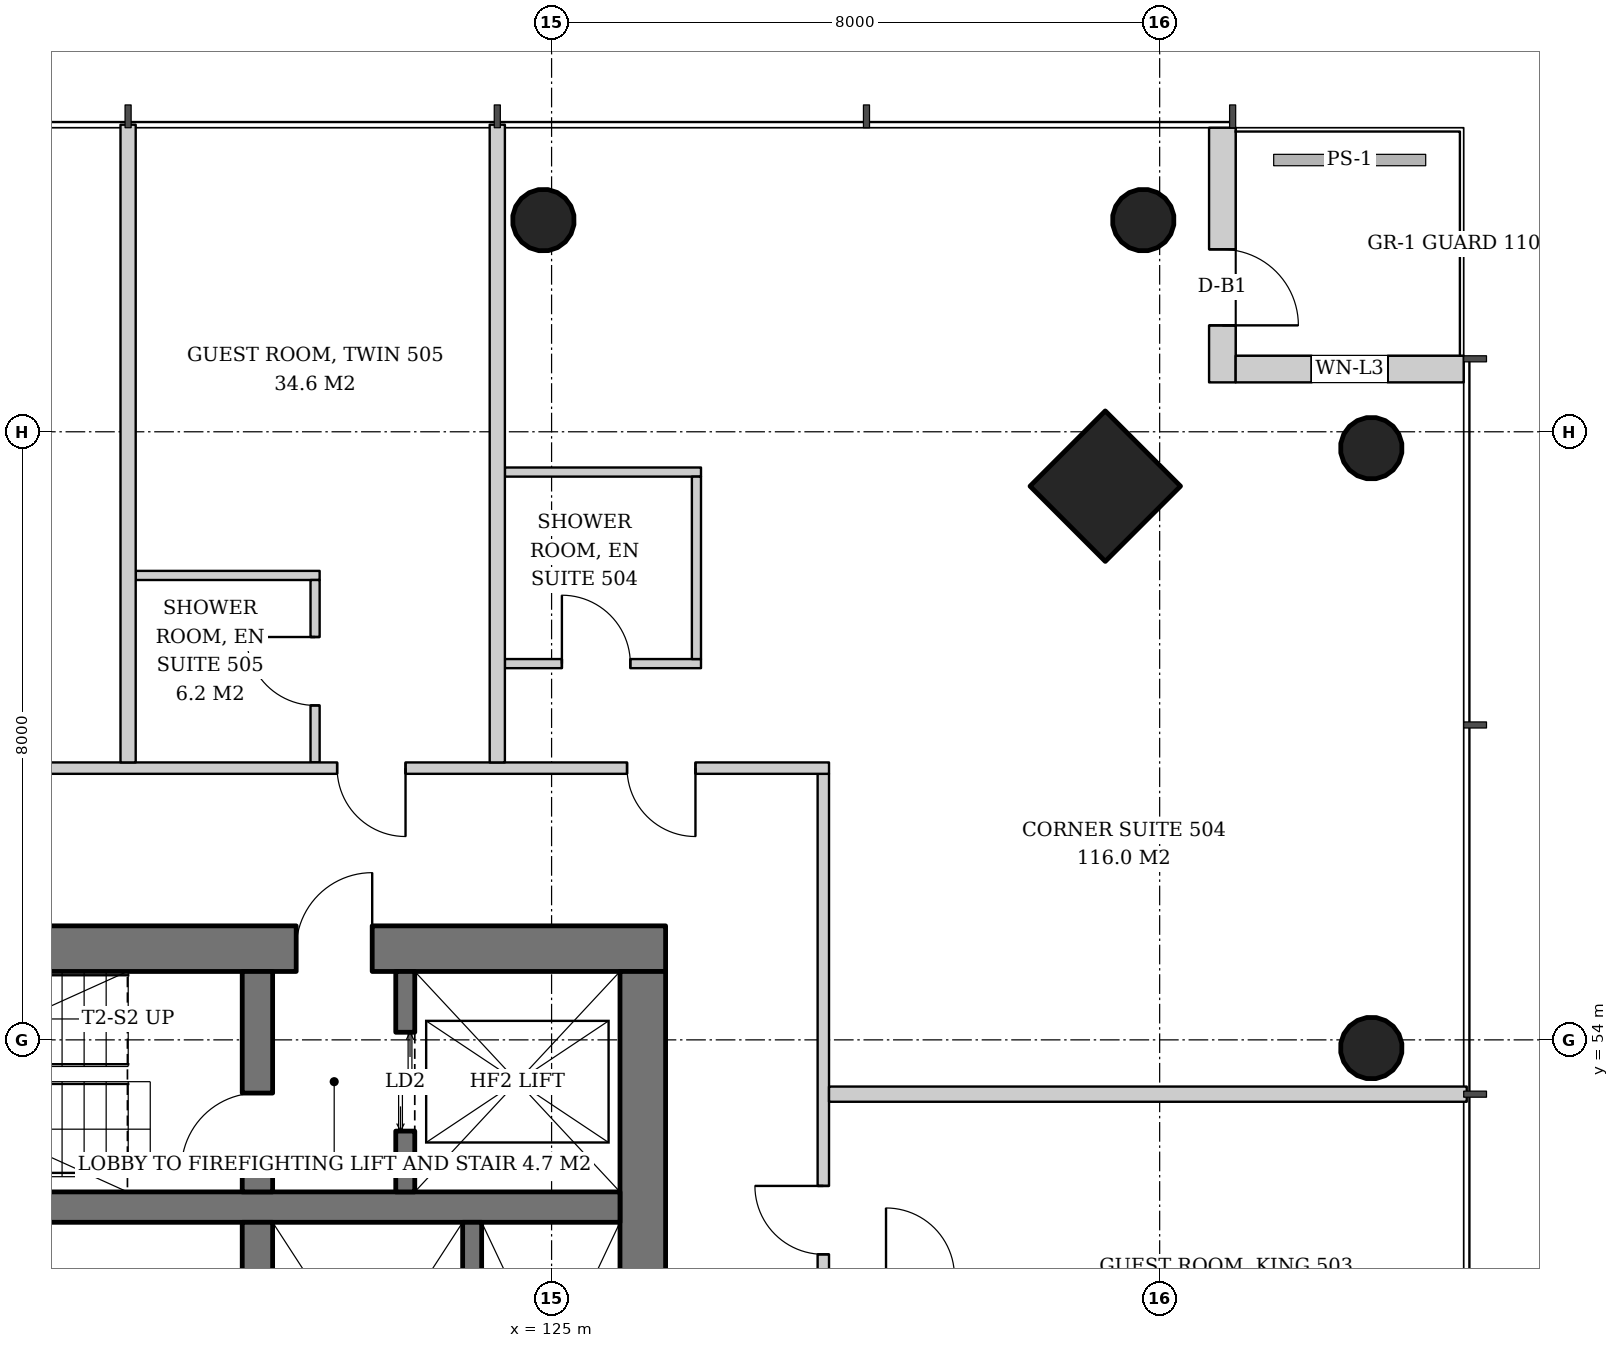
"""IFC4 building model, lengths in metres.
Left out: names, types, materials, properties, quantities, classifications, styles, units other than length and angle.
Written with IfcOpenShell. Run it as: python <this file> out.ifc"""

import sys

from ifc_helpers import new_model, si_unit, direction, frame, frame_2d, origin, origin_2d, place, context, subcontext, project, spatial, rectangle, hollow_circle, extrude, element, fill, save


model = new_model("IFC4")
c1 = context("Model", 3, precision=1e-05, world=origin(), true_north=direction((0.0, 1.0)))
c2 = subcontext(c1, "Body", "Model", "MODEL_VIEW")
j1 = project(units=[si_unit("LENGTHUNIT", "METRE"), si_unit("PLANEANGLEUNIT", "RADIAN")], contexts=[c1])
p1 = place(None, origin())
s1 = spatial("IfcSite", under=j1, at=p1, CompositionType="ELEMENT")
p2 = place(p1, origin())
s2 = spatial("IfcBuilding", under=s1, at=p2, CompositionType="ELEMENT")
p3 = place(p2, frame((0.0, 0.0, 24.8)))
s3 = spatial("IfcBuildingStorey", under=s2, at=p3, CompositionType="ELEMENT", Elevation=24.8)
p4 = place(p3, frame((132.336, 61.336, 0.0), z_axis=(-0.043029647111, -0.043029647111, 0.998146732169), x_axis=(0.707106781187, -0.707106781187, 0.0)))
e1 = element("IfcColumn", 1, at=p4, inside=s3, PredefinedType="COLUMN", context=c2, shape_type="SweptSolid", body=[
    extrude(rectangle(XDim=1.4, YDim=1.4, at=origin_2d()), origin(), (0.0, 0.0, 1.0), 3.807),
])
p5 = place(p3, frame((135.836, 61.836, 0.0), z_axis=(-0.043029647111, -0.043029647111, 0.998146732169), x_axis=(0.707106781187, -0.707106781187, 0.0)))
e2 = element("IfcColumn", 2, at=p5, inside=s3, PredefinedType="COLUMN", context=c2, shape_type="SweptSolid", body=[
    extrude(hollow_circle(Radius=0.406, WallThickness=0.03, at=origin_2d()), origin(), (0.0, 0.0, 1.0), 3.807),
])
p6 = place(p3, frame((135.836, 53.918, 0.0), z_axis=(-0.043059525333, -0.021561848751, 0.998839808957), x_axis=(0.44774654769, -0.894160516368, 0.0)))
e3 = element("IfcColumn", 3, at=p6, inside=s3, PredefinedType="COLUMN", context=c2, shape_type="SweptSolid", body=[
    extrude(hollow_circle(Radius=0.406, WallThickness=0.03, at=origin_2d()), origin(), (0.0, 0.0, 1.0), 3.804),
])
p7 = place(p3, frame((132.836, 64.836, 0.0), z_axis=(-0.043029647111, -0.043029647111, 0.998146732169), x_axis=(0.707106781187, -0.707106781187, 0.0)))
e4 = element("IfcColumn", 4, at=p7, inside=s3, PredefinedType="COLUMN", context=c2, shape_type="SweptSolid", body=[
    extrude(hollow_circle(Radius=0.406, WallThickness=0.03, at=origin_2d()), origin(), (0.0, 0.0, 1.0), 3.807),
])
p8 = place(p3, frame((124.918, 64.836, 0.0), z_axis=(-0.021561848751, -0.043059525333, 0.998839808957), x_axis=(0.894160516368, -0.44774654769, 0.0)))
e5 = element("IfcColumn", 5, at=p8, inside=s3, PredefinedType="COLUMN", context=c2, shape_type="SweptSolid", body=[
    extrude(hollow_circle(Radius=0.406, WallThickness=0.03, at=origin_2d()), origin(), (0.0, 0.0, 1.0), 3.804),
])
p9 = place(p3, frame((107.5, 55.2, 0.0), z_axis=(0.0, 0.0, 1.0), x_axis=(1.0, 0.0, 0.0)))
e6 = element("IfcWall", 6, at=p9, inside=s3, PredefinedType="SHEAR", context=c2, shape_type="SweptSolid", body=[
    extrude(rectangle(XDim=19.0, YDim=0.6, at=frame_2d((9.5, 0.0))), origin(), (0.0, 0.0, 1.0), 3.8),
])
p10 = place(p9, frame((14.14, 0.0, 0.0)))
e7 = element("IfcOpeningElement", 7, at=p10, cuts=e6, PredefinedType="OPENING", context=c2, shape_type="SweptSolid", body=[
    extrude(rectangle(XDim=1.0, YDim=2.1, at=frame_2d((0.5, 1.05))), frame((0.0, 0.31, 0.0), z_axis=(0.0, -1.0, 0.0), x_axis=(1.0, 0.0, 0.0)), (0.0, 0.0, 1.0), 0.62),
])
p11 = place(p9, frame((1.675, 0.0, 0.0)))
e8 = element("IfcOpeningElement", 8, at=p11, cuts=e6, PredefinedType="OPENING", context=c2, shape_type="SweptSolid", body=[
    extrude(rectangle(XDim=1.0, YDim=2.1, at=frame_2d((0.5, 1.05))), frame((0.0, 0.31, 0.0), z_axis=(0.0, -1.0, 0.0), x_axis=(1.0, 0.0, 0.0)), (0.0, 0.0, 1.0), 0.62),
])
p12 = place(p9, frame((3.587, 0.0, 0.0)))
e9 = element("IfcOpeningElement", 9, at=p12, cuts=e6, PredefinedType="OPENING", context=c2, shape_type="SweptSolid", body=[
    extrude(rectangle(XDim=1.0, YDim=2.1, at=frame_2d((0.5, 1.05))), frame((0.0, 0.31, 0.0), z_axis=(0.0, -1.0, 0.0), x_axis=(1.0, 0.0, 0.0)), (0.0, 0.0, 1.0), 0.62),
])
p13 = place(p3, frame((126.2, 37.1, 0.0), z_axis=(0.0, 0.0, 1.0), x_axis=(0.0, 1.0, 0.0)))
e10 = element("IfcWall", 10, at=p13, inside=s3, PredefinedType="SHEAR", context=c2, shape_type="SweptSolid", body=[
    extrude(rectangle(XDim=17.8, YDim=0.6, at=frame_2d((8.9, 0.0))), origin(), (0.0, 0.0, 1.0), 3.8),
])
p14 = place(p13, frame((8.0, 0.0, 0.0)))
e11 = element("IfcOpeningElement", 11, at=p14, cuts=e10, PredefinedType="OPENING", context=c2, shape_type="SweptSolid", body=[
    extrude(rectangle(XDim=1.8, YDim=2.4, at=frame_2d((0.9, 1.2))), frame((0.0, 0.31, 0.0), z_axis=(0.0, -1.0, 0.0), x_axis=(1.0, 0.0, 0.0)), (0.0, 0.0, 1.0), 0.62),
])
p15 = place(p3, frame((108.1, 51.8, 0.0), z_axis=(0.0, 0.0, 1.0), x_axis=(1.0, 0.0, 0.0)))
e12 = element("IfcWall", 12, at=p15, inside=s3, PredefinedType="SHEAR", context=c2, shape_type="SweptSolid", body=[
    extrude(rectangle(XDim=17.8, YDim=0.4, at=frame_2d((8.9, 0.0))), origin(), (0.0, 0.0, 1.0), 3.8),
])
p16 = place(p3, frame((121.13, 40.4, 0.0), z_axis=(0.0, 0.0, 1.0), x_axis=(0.0, 1.0, 0.0)))
e13 = element("IfcWall", 13, at=p16, inside=s3, PredefinedType="SHEAR", context=c2, shape_type="SweptSolid", body=[
    extrude(rectangle(XDim=11.2, YDim=0.4, at=frame_2d((5.6, 0.0))), origin(), (0.0, 0.0, 1.0), 3.8),
])
p17 = place(p3, frame((121.13, 52.0, 0.0), z_axis=(0.0, 0.0, 1.0), x_axis=(0.0, 1.0, 0.0)))
e14 = element("IfcWall", 14, at=p17, inside=s3, PredefinedType="SHEAR", context=c2, shape_type="SweptSolid", body=[
    extrude(rectangle(XDim=2.9, YDim=0.4, at=frame_2d((1.45, 0.0))), origin(), (0.0, 0.0, 1.0), 3.8),
])
p18 = place(p17, frame((0.3, 0.0, 0.0)))
e15 = element("IfcOpeningElement", 15, at=p18, cuts=e14, PredefinedType="OPENING", context=c2, shape_type="SweptSolid", body=[
    extrude(rectangle(XDim=1.0, YDim=2.1, at=frame_2d((0.5, 1.05))), frame((0.0, 0.21, 0.0), z_axis=(0.0, -1.0, 0.0), x_axis=(1.0, 0.0, 0.0)), (0.0, 0.0, 1.0), 0.42),
])
p19 = place(p3, frame((133.825, 66.0, 0.0), z_axis=(0.0, 0.0, 1.0), x_axis=(0.0, -1.0, 0.0)))
e16 = element("IfcWall", 16, at=p19, inside=s3, PredefinedType="SOLIDWALL", context=c2, shape_type="SweptSolid", body=[
    extrude(rectangle(XDim=3.35, YDim=0.35, at=frame_2d((1.675, 0.0))), origin(), (0.0, 0.0, 1.0), 3.6),
])
p20 = place(p19, frame((1.6, 0.0, 0.0)))
e17 = element("IfcOpeningElement", 17, at=p20, cuts=e16, PredefinedType="OPENING", context=c2, shape_type="SweptSolid", body=[
    extrude(rectangle(XDim=1.0, YDim=2.4, at=frame_2d((0.5, 1.2))), frame((0.0, 0.185, 0.0), z_axis=(0.0, -1.0, 0.0), x_axis=(1.0, 0.0, 0.0)), (0.0, 0.0, 1.0), 0.37),
])
p21 = place(p3, frame((134.0, 62.825, 0.0), z_axis=(0.0, 0.0, 1.0), x_axis=(1.0, 0.0, 0.0)))
e18 = element("IfcWall", 18, at=p21, inside=s3, PredefinedType="SOLIDWALL", context=c2, shape_type="SweptSolid", body=[
    extrude(rectangle(XDim=3.0, YDim=0.35, at=frame_2d((1.5, 0.0))), origin(), (0.0, 0.0, 1.0), 3.6),
])
p22 = place(p21, frame((1.0, 0.0, 0.9)))
e19 = element("IfcOpeningElement", 19, at=p22, cuts=e18, PredefinedType="OPENING", context=c2, shape_type="SweptSolid", body=[
    extrude(rectangle(XDim=1.0, YDim=2.4, at=frame_2d((0.5, 1.2))), frame((0.0, 0.185, 0.0), z_axis=(0.0, -1.0, 0.0), x_axis=(1.0, 0.0, 0.0)), (0.0, 0.0, 1.0), 0.37),
])
p23 = place(p3, frame((123.075, 52.0, 0.0), z_axis=(0.0, 0.0, 1.0), x_axis=(0.0, 1.0, 0.0)))
e20 = element("IfcWall", 20, at=p23, inside=s3, PredefinedType="SHEAR", context=c2, shape_type="SweptSolid", body=[
    extrude(rectangle(XDim=2.9, YDim=0.25, at=frame_2d((1.45, 0.0))), origin(), (0.0, 0.0, 1.0), 3.8),
])
p24 = place(p23, frame((0.8, 0.0, 0.0)))
e21 = element("IfcOpeningElement", 21, at=p24, cuts=e20, PredefinedType="OPENING", context=c2, shape_type="SweptSolid", body=[
    extrude(rectangle(XDim=1.3, YDim=2.2, at=frame_2d((0.65, 1.1))), frame((0.0, 0.135, 0.0), z_axis=(0.0, -1.0, 0.0), x_axis=(1.0, 0.0, 0.0)), (0.0, 0.0, 1.0), 0.27),
])
p25 = place(p3, frame((123.955, 47.75, 0.0), z_axis=(0.0, 0.0, 1.0), x_axis=(0.0, 1.0, 0.0)))
e22 = element("IfcWall", 22, at=p25, inside=s3, PredefinedType="SHEAR", context=c2, shape_type="SweptSolid", body=[
    extrude(rectangle(XDim=3.85, YDim=0.25, at=frame_2d((1.925, 0.0))), origin(), (0.0, 0.0, 1.0), 3.8),
])
p26 = place(p3, frame((128.575, 34.35, 0.0), z_axis=(0.0, 0.0, 1.0), x_axis=(0.0, 1.0, 0.0)))
e23 = element("IfcWall", 23, at=p26, inside=s3, PredefinedType="PARTITIONING", context=c2, shape_type="SweptSolid", body=[
    extrude(rectangle(XDim=23.15, YDim=0.15, at=frame_2d((11.575, 0.0))), origin(), (0.0, 0.0, 1.0), 2.8),
])
p27 = place(p26, frame((1.757, 0.0, 0.0)))
e24 = element("IfcOpeningElement", 24, at=p27, cuts=e23, PredefinedType="OPENING", context=c2, shape_type="SweptSolid", body=[
    extrude(rectangle(XDim=0.9, YDim=2.1, at=frame_2d((0.45, 1.05))), frame((0.0, 0.085, 0.0), z_axis=(0.0, -1.0, 0.0), x_axis=(1.0, 0.0, 0.0)), (0.0, 0.0, 1.0), 0.17),
])
p28 = place(p26, frame((10.428, 0.0, 0.0)))
e25 = element("IfcOpeningElement", 25, at=p28, cuts=e23, PredefinedType="OPENING", context=c2, shape_type="SweptSolid", body=[
    extrude(rectangle(XDim=0.9, YDim=2.1, at=frame_2d((0.45, 1.05))), frame((0.0, 0.085, 0.0), z_axis=(0.0, -1.0, 0.0), x_axis=(1.0, 0.0, 0.0)), (0.0, 0.0, 1.0), 0.17),
])
p29 = place(p26, frame((16.829, 0.0, 0.0)))
e26 = element("IfcOpeningElement", 26, at=p29, cuts=e23, PredefinedType="OPENING", context=c2, shape_type="SweptSolid", body=[
    extrude(rectangle(XDim=0.9, YDim=2.1, at=frame_2d((0.45, 1.05))), frame((0.0, 0.085, 0.0), z_axis=(0.0, -1.0, 0.0), x_axis=(1.0, 0.0, 0.0)), (0.0, 0.0, 1.0), 0.17),
])
p30 = place(p3, frame((128.65, 53.286, 0.0), z_axis=(0.0, 0.0, 1.0), x_axis=(1.0, 0.0, 0.0)))
e27 = element("IfcWall", 27, at=p30, inside=s3, PredefinedType="PARTITIONING", context=c2, shape_type="SweptSolid", body=[
    extrude(rectangle(XDim=8.39, YDim=0.2, at=frame_2d((4.195, 0.0))), origin(), (0.0, 0.0, 1.0), 3.05),
])
p31 = place(p3, frame((124.386, 58.95, 0.0), z_axis=(0.0, 0.0, 1.0), x_axis=(1.0, 0.0, 0.0)))
e28 = element("IfcWall", 28, at=p31, inside=s3, PredefinedType="PARTITIONING", context=c2, shape_type="SweptSolid", body=[
    extrude(rectangle(XDim=2.58, YDim=0.12, at=frame_2d((1.29, 0.0))), origin(), (0.0, 0.0, 1.0), 2.8),
])
p32 = place(p31, frame((0.75, 0.0, 0.0)))
e29 = element("IfcOpeningElement", 29, at=p32, cuts=e28, PredefinedType="OPENING", context=c2, shape_type="SweptSolid", body=[
    extrude(rectangle(XDim=0.9, YDim=2.1, at=frame_2d((0.45, 1.05))), frame((0.0, 0.07, 0.0), z_axis=(0.0, -1.0, 0.0), x_axis=(1.0, 0.0, 0.0)), (0.0, 0.0, 1.0), 0.14),
])
p33 = place(p3, frame((124.386, 61.47, 0.0), z_axis=(0.0, 0.0, 1.0), x_axis=(1.0, 0.0, 0.0)))
e30 = element("IfcWall", 30, at=p33, inside=s3, PredefinedType="PARTITIONING", context=c2, shape_type="SweptSolid", body=[
    extrude(rectangle(XDim=2.58, YDim=0.12, at=frame_2d((1.29, 0.0))), origin(), (0.0, 0.0, 1.0), 2.8),
])
p34 = place(p3, frame((126.906, 59.01, 0.0), z_axis=(0.0, 0.0, 1.0), x_axis=(0.0, 1.0, 0.0)))
e31 = element("IfcWall", 31, at=p34, inside=s3, PredefinedType="PARTITIONING", context=c2, shape_type="SweptSolid", body=[
    extrude(rectangle(XDim=2.4, YDim=0.12, at=frame_2d((1.2, 0.0))), origin(), (0.0, 0.0, 1.0), 2.847),
])
p35 = place(p3, frame((121.948, 60.11, 0.0), z_axis=(0.0, 0.0, 1.0), x_axis=(-1.0, 0.0, 0.0)))
e32 = element("IfcWall", 32, at=p35, inside=s3, PredefinedType="PARTITIONING", context=c2, shape_type="SweptSolid", body=[
    extrude(rectangle(XDim=2.42, YDim=0.12, at=frame_2d((1.21, 0.0))), origin(), (0.0, 0.0, 1.0), 3.6),
])
p36 = place(p3, frame((121.889, 57.65, 0.0), z_axis=(0.0, 0.0, 1.0), x_axis=(0.0, 1.0, 0.0)))
e33 = element("IfcWall", 33, at=p36, inside=s3, PredefinedType="PARTITIONING", context=c2, shape_type="SweptSolid", body=[
    extrude(rectangle(XDim=2.4, YDim=0.12, at=frame_2d((1.2, 0.0))), origin(), (0.0, 0.0, 1.0), 3.6),
])
p37 = place(p36, frame((0.75, 0.0, 0.0)))
e34 = element("IfcOpeningElement", 34, at=p37, cuts=e33, PredefinedType="OPENING", context=c2, shape_type="SweptSolid", body=[
    extrude(rectangle(XDim=0.9, YDim=2.1, at=frame_2d((0.45, 1.05))), frame((0.0, 0.07, 0.0), z_axis=(0.0, -1.0, 0.0), x_axis=(1.0, 0.0, 0.0)), (0.0, 0.0, 1.0), 0.14),
])
p38 = place(p3, frame((128.65, 57.575, 0.0), z_axis=(0.0, 0.0, 1.0), x_axis=(-1.0, 0.0, 0.0)))
e35 = element("IfcWall", 35, at=p38, inside=s3, PredefinedType="PARTITIONING", context=c2, shape_type="SweptSolid", body=[
    extrude(rectangle(XDim=23.15, YDim=0.15, at=frame_2d((11.575, 0.0))), origin(), (0.0, 0.0, 1.0), 2.8),
])
p39 = place(p38, frame((1.757, 0.0, 0.0)))
e36 = element("IfcOpeningElement", 36, at=p39, cuts=e35, PredefinedType="OPENING", context=c2, shape_type="SweptSolid", body=[
    extrude(rectangle(XDim=0.9, YDim=2.1, at=frame_2d((0.45, 1.05))), frame((0.0, 0.085, 0.0), z_axis=(0.0, -1.0, 0.0), x_axis=(1.0, 0.0, 0.0)), (0.0, 0.0, 1.0), 0.17),
])
p40 = place(p38, frame((5.572, 0.0, 0.0)))
e37 = element("IfcOpeningElement", 37, at=p40, cuts=e35, PredefinedType="OPENING", context=c2, shape_type="SweptSolid", body=[
    extrude(rectangle(XDim=0.9, YDim=2.1, at=frame_2d((0.45, 1.05))), frame((0.0, 0.085, 0.0), z_axis=(0.0, -1.0, 0.0), x_axis=(1.0, 0.0, 0.0)), (0.0, 0.0, 1.0), 0.17),
])
p41 = place(p38, frame((11.921, 0.0, 0.0)))
e38 = element("IfcOpeningElement", 38, at=p41, cuts=e35, PredefinedType="OPENING", context=c2, shape_type="SweptSolid", body=[
    extrude(rectangle(XDim=1.0, YDim=2.1, at=frame_2d((0.5, 1.05))), frame((0.0, 0.085, 0.0), z_axis=(0.0, -1.0, 0.0), x_axis=(1.0, 0.0, 0.0)), (0.0, 0.0, 1.0), 0.17),
])
for number, where, z_axis, x_axis in (
    (39, (124.286, 57.65, 0.0), (0.0, 0.0, 1.0), (0.0, 1.0, 0.0)),
    (40, (119.428, 57.65, 0.0), (0.0, 0.0, 1.0), (0.0, 1.0, 0.0)),
):
    element("IfcWall", number, at=place(p3, frame(where, z_axis=z_axis, x_axis=x_axis)), inside=s3, PredefinedType="PARTITIONING", context=c2, shape_type="SweptSolid", body=[
        extrude(rectangle(XDim=8.39, YDim=0.2, at=frame_2d((4.195, 0.0))), origin(), (0.0, 0.0, 1.0), 3.05),
    ])
p42 = place(p20, origin())
e41 = element("IfcDoor", 41, at=p42, inside=s3, OperationType="SINGLE_SWING_RIGHT", PredefinedType="DOOR", context=c2, shape_type="SweptSolid", body=[
    extrude(rectangle(XDim=1.0, YDim=2.4, at=frame_2d((0.5, 1.2))), frame((0.0, 0.025, 0.0), z_axis=(0.0, -1.0, 0.0), x_axis=(1.0, 0.0, 0.0)), (0.0, 0.0, 1.0), 0.05),
])
fill(e17, e41)
p43 = place(p22, origin())
e42 = element("IfcWindow", 42, at=p43, inside=s3, PartitioningType="SINGLE_PANEL", PredefinedType="WINDOW", context=c2, shape_type="SweptSolid", body=[
    extrude(rectangle(XDim=1.0, YDim=2.4, at=frame_2d((0.5, 1.2))), frame((0.0, 0.03, 0.0), z_axis=(0.0, -1.0, 0.0), x_axis=(1.0, 0.0, 0.0)), (0.0, 0.0, 1.0), 0.06),
])
fill(e19, e42)
p44 = place(p24, origin())
e43 = element("IfcDoor", 43, at=p44, inside=s3, OperationType="DOUBLE_DOOR_SLIDING", PredefinedType="DOOR", context=c2, shape_type="SweptSolid", body=[
    extrude(rectangle(XDim=1.3, YDim=2.2, at=frame_2d((0.65, 1.1))), frame((0.0, 0.025, 0.0), z_axis=(0.0, -1.0, 0.0), x_axis=(1.0, 0.0, 0.0)), (0.0, 0.0, 1.0), 0.05),
])
fill(e21, e43)
p45 = place(p18, origin())
e44 = element("IfcDoor", 44, at=p45, inside=s3, OperationType="SINGLE_SWING_LEFT", PredefinedType="DOOR", context=c2, shape_type="SweptSolid", body=[
    extrude(rectangle(XDim=1.0, YDim=2.1, at=frame_2d((0.5, 1.05))), frame((0.0, 0.025, 0.0), z_axis=(0.0, -1.0, 0.0), x_axis=(1.0, 0.0, 0.0)), (0.0, 0.0, 1.0), 0.05),
])
fill(e15, e44)
p46 = place(p10, origin())
e45 = element("IfcDoor", 45, at=p46, inside=s3, OperationType="SINGLE_SWING_RIGHT", PredefinedType="DOOR", context=c2, shape_type="SweptSolid", body=[
    extrude(rectangle(XDim=1.0, YDim=2.1, at=frame_2d((0.5, 1.05))), frame((0.0, 0.025, 0.0), z_axis=(0.0, -1.0, 0.0), x_axis=(1.0, 0.0, 0.0)), (0.0, 0.0, 1.0), 0.05),
])
fill(e7, e45)
p47 = place(p29, origin())
e46 = element("IfcDoor", 46, at=p47, inside=s3, OperationType="SINGLE_SWING_RIGHT", PredefinedType="DOOR", context=c2, shape_type="SweptSolid", body=[
    extrude(rectangle(XDim=0.9, YDim=2.1, at=frame_2d((0.45, 1.05))), frame((0.0, 0.025, 0.0), z_axis=(0.0, -1.0, 0.0), x_axis=(1.0, 0.0, 0.0)), (0.0, 0.0, 1.0), 0.05),
])
fill(e26, e46)
p48 = place(p32, origin())
e47 = element("IfcDoor", 47, at=p48, inside=s3, OperationType="SINGLE_SWING_LEFT", PredefinedType="DOOR", context=c2, shape_type="SweptSolid", body=[
    extrude(rectangle(XDim=0.9, YDim=2.1, at=frame_2d((0.45, 1.05))), frame((0.0, 0.025, 0.0), z_axis=(0.0, -1.0, 0.0), x_axis=(1.0, 0.0, 0.0)), (0.0, 0.0, 1.0), 0.05),
])
fill(e29, e47)
p49 = place(p37, origin())
e48 = element("IfcDoor", 48, at=p49, inside=s3, OperationType="SINGLE_SWING_RIGHT", PredefinedType="DOOR", context=c2, shape_type="SweptSolid", body=[
    extrude(rectangle(XDim=0.9, YDim=2.1, at=frame_2d((0.45, 1.05))), frame((0.0, 0.025, 0.0), z_axis=(0.0, -1.0, 0.0), x_axis=(1.0, 0.0, 0.0)), (0.0, 0.0, 1.0), 0.05),
])
fill(e34, e48)
p50 = place(p39, origin())
e49 = element("IfcDoor", 49, at=p50, inside=s3, OperationType="SINGLE_SWING_LEFT", PredefinedType="DOOR", context=c2, shape_type="SweptSolid", body=[
    extrude(rectangle(XDim=0.9, YDim=2.1, at=frame_2d((0.45, 1.05))), frame((0.0, 0.025, 0.0), z_axis=(0.0, -1.0, 0.0), x_axis=(1.0, 0.0, 0.0)), (0.0, 0.0, 1.0), 0.05),
])
fill(e36, e49)
p51 = place(p40, origin())
e50 = element("IfcDoor", 50, at=p51, inside=s3, OperationType="SINGLE_SWING_LEFT", PredefinedType="DOOR", context=c2, shape_type="SweptSolid", body=[
    extrude(rectangle(XDim=0.9, YDim=2.1, at=frame_2d((0.45, 1.05))), frame((0.0, 0.025, 0.0), z_axis=(0.0, -1.0, 0.0), x_axis=(1.0, 0.0, 0.0)), (0.0, 0.0, 1.0), 0.05),
])
fill(e37, e50)
save(model, sys.argv[1])
